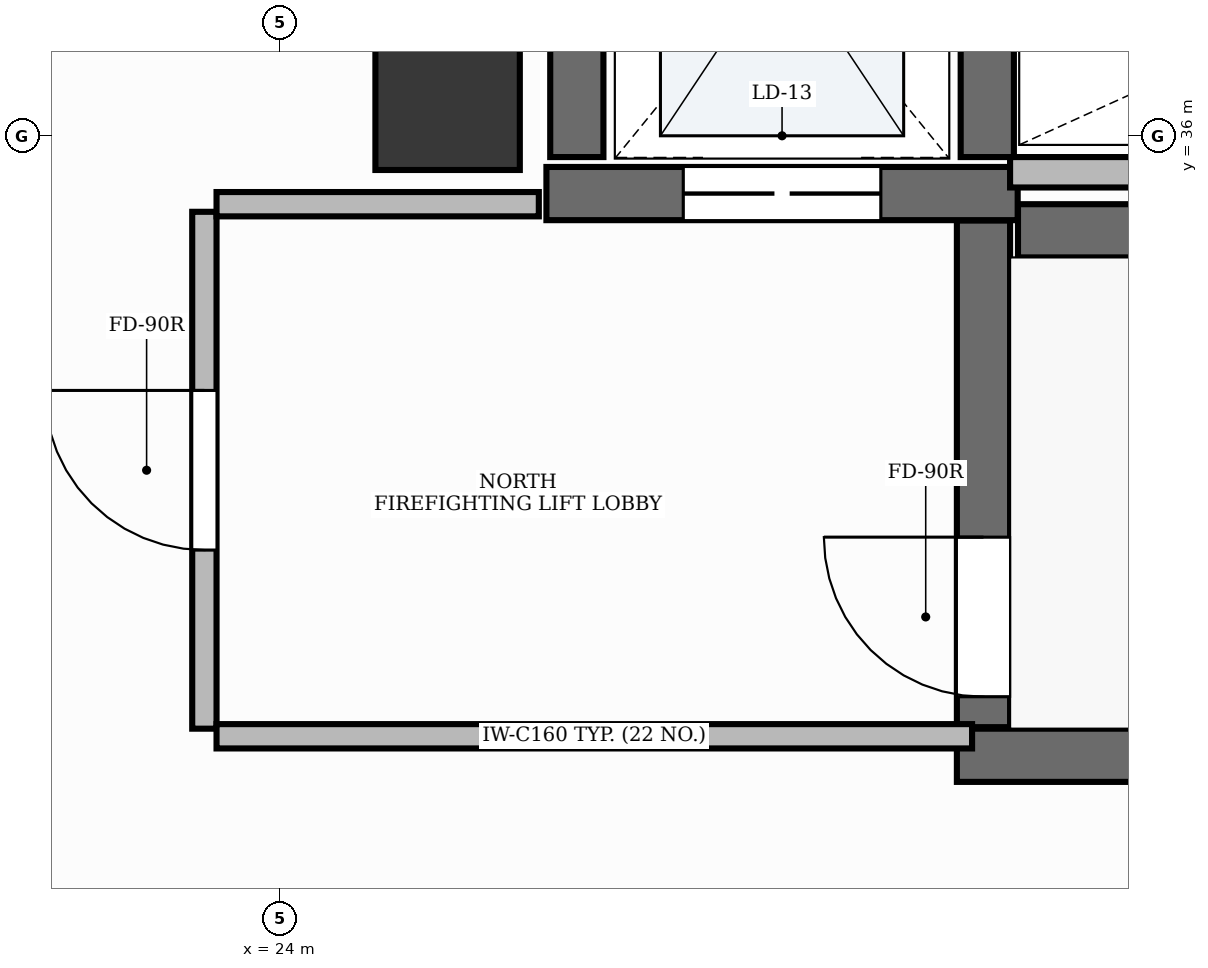
"""IFC4 building model, lengths in metres.
Left out: names, types, materials, properties, quantities, classifications, styles, units other than length and angle.
Written with IfcOpenShell. Run it as: python <this file> out.ifc"""

import sys

from ifc_helpers import new_model, si_unit, direction, frame, frame_2d, origin, origin_2d, place, context, subcontext, project, spatial, rectangle, extrude, element, fill, save


model = new_model("IFC4")
c1 = context("Model", 3, precision=1e-05, world=origin(), true_north=direction((0.0, 1.0)))
c2 = subcontext(c1, "Body", "Model", "MODEL_VIEW")
j1 = project(units=[si_unit("LENGTHUNIT", "METRE"), si_unit("PLANEANGLEUNIT", "RADIAN")], contexts=[c1])
p1 = place(None, origin())
s1 = spatial("IfcSite", under=j1, at=p1, CompositionType="ELEMENT")
p2 = place(p1, origin())
s2 = spatial("IfcBuilding", under=s1, at=p2, CompositionType="ELEMENT")
p3 = place(p2, frame((0.0, 0.0, 291.0)))
s3 = spatial("IfcBuildingStorey", under=s2, at=p3, CompositionType="ELEMENT", Elevation=291.0)
p4 = place(p3, frame((28.852, 35.375, 0.0), z_axis=(0.0, 0.0, 1.0), x_axis=(1.0, 0.0, 0.0)))
e1 = element("IfcWall", 1, at=p4, inside=s3, PredefinedType="SHEAR", context=c2, shape_type="SweptSolid", body=[
    extrude(rectangle(XDim=8.148, YDim=0.35, at=frame_2d((4.074, 0.0))), origin(), (0.0, 0.0, 1.0), 6.3),
])
p5 = place(p3, frame((28.45, 31.925, 0.0), z_axis=(0.0, 0.0, 1.0), x_axis=(1.0, 0.0, 0.0)))
e2 = element("IfcWall", 2, at=p5, inside=s3, PredefinedType="SHEAR", context=c2, shape_type="SweptSolid", body=[
    extrude(rectangle(XDim=8.55, YDim=0.35, at=frame_2d((4.275, 0.0))), origin(), (0.0, 0.0, 1.0), 6.3),
])
p6 = place(p3, frame((28.625, 32.11, 0.0), z_axis=(0.0, 0.0, 1.0), x_axis=(0.0, 1.0, 0.0)))
e3 = element("IfcWall", 3, at=p6, inside=s3, PredefinedType="SHEAR", context=c2, shape_type="SweptSolid", body=[
    extrude(rectangle(XDim=3.333, YDim=0.35, at=frame_2d((1.667, 0.0))), origin(), (0.0, 0.0, 1.0), 6.3),
])
p7 = place(p6, frame((0.2, 0.0, 0.0)))
e4 = element("IfcOpeningElement", 4, at=p7, cuts=e3, PredefinedType="OPENING", context=c2, shape_type="SweptSolid", body=[
    extrude(rectangle(XDim=1.05, YDim=2.15, at=frame_2d((0.525, 1.075))), frame((0.0, 0.19, 0.0), z_axis=(0.0, -1.0, 0.0), x_axis=(1.0, 0.0, 0.0)), (0.0, 0.0, 1.0), 0.38),
])
p8 = place(p3, frame((25.75, 35.62, 0.0), z_axis=(0.0, 0.0, 1.0), x_axis=(1.0, 0.0, 0.0)))
e5 = element("IfcWall", 5, at=p8, inside=s3, PredefinedType="SHEAR", context=c2, shape_type="SweptSolid", body=[
    extrude(rectangle(XDim=3.1, YDim=0.35, at=frame_2d((1.55, 0.0))), origin(), (0.0, 0.0, 1.0), 6.3),
])
p9 = place(p8, frame((0.9, 0.0, 0.0)))
e6 = element("IfcOpeningElement", 6, at=p9, cuts=e5, PredefinedType="OPENING", context=c2, shape_type="SweptSolid", body=[
    extrude(rectangle(XDim=1.3, YDim=2.2, at=frame_2d((0.65, 1.1))), frame((0.0, 0.19, 0.0), z_axis=(0.0, -1.0, 0.0), x_axis=(1.0, 0.0, 0.0)), (0.0, 0.0, 1.0), 0.38),
])
for number, where, z_axis, x_axis in (
    (7, (25.95, 35.86, 0.0), (0.0, 0.0, 1.0), (0.0, 1.0, 0.0)),
    (8, (28.65, 35.86, 0.0), (0.0, 0.0, 1.0), (0.0, 1.0, 0.0)),
):
    element("IfcWall", number, at=place(p3, frame(where, z_axis=z_axis, x_axis=x_axis)), inside=s3, PredefinedType="SHEAR", context=c2, shape_type="SweptSolid", body=[
        extrude(rectangle(XDim=2.7, YDim=0.35, at=frame_2d((1.35, 0.0))), origin(), (0.0, 0.0, 1.0), 6.3),
    ])
p10 = place(p3, frame((25.1, 36.25, -0.0), z_axis=(0.0, 0.0, 1.0), x_axis=(1.0, 0.0, 0.0)))
e9 = element("IfcColumn", 9, at=p10, inside=s3, PredefinedType="PILASTER", context=c2, shape_type="SweptSolid", body=[
    extrude(rectangle(XDim=0.95, YDim=0.95, at=origin_2d()), origin(), (0.0, 0.0, 1.0), 6.301),
])
p11 = place(p3, frame((28.8, 35.76, 0.0), z_axis=(0.0, 0.0, 1.0), x_axis=(1.0, 0.0, 0.0)))
e10 = element("IfcWall", 10, at=p11, inside=s3, PredefinedType="PARTITIONING", context=c2, shape_type="SweptSolid", body=[
    extrude(rectangle(XDim=4.57, YDim=0.2, at=frame_2d((2.285, 0.0))), origin(), (0.0, 0.0, 1.0), 4.61),
])
p12 = place(p3, frame((23.5, 32.1, 0.0), z_axis=(0.0, 0.0, 1.0), x_axis=(0.0, 1.0, 0.0)))
e11 = element("IfcWall", 11, at=p12, inside=s3, PredefinedType="PARTITIONING", context=c2, shape_type="SweptSolid", body=[
    extrude(rectangle(XDim=3.4, YDim=0.16, at=frame_2d((1.7, 0.0))), origin(), (0.0, 0.0, 1.0), 4.61),
])
p13 = place(p12, frame((1.175, 0.0, 0.0)))
e12 = element("IfcOpeningElement", 12, at=p13, cuts=e11, PredefinedType="OPENING", context=c2, shape_type="SweptSolid", body=[
    extrude(rectangle(XDim=1.05, YDim=2.15, at=frame_2d((0.525, 1.075))), frame((0.0, 0.095, 0.0), z_axis=(0.0, -1.0, 0.0), x_axis=(1.0, 0.0, 0.0)), (0.0, 0.0, 1.0), 0.19),
])
p14 = place(p3, frame((23.58, 32.05, 0.0), z_axis=(0.0, 0.0, 1.0), x_axis=(1.0, 0.0, 0.0)))
e13 = element("IfcWall", 13, at=p14, inside=s3, PredefinedType="PARTITIONING", context=c2, shape_type="SweptSolid", body=[
    extrude(rectangle(XDim=4.97, YDim=0.16, at=frame_2d((2.485, 0.0))), origin(), (0.0, 0.0, 1.0), 4.61),
])
p15 = place(p3, frame((23.58, 35.55, 0.0), z_axis=(0.0, 0.0, 1.0), x_axis=(1.0, 0.0, 0.0)))
e14 = element("IfcWall", 14, at=p15, inside=s3, PredefinedType="PARTITIONING", context=c2, shape_type="SweptSolid", body=[
    extrude(rectangle(XDim=2.12, YDim=0.16, at=frame_2d((1.06, 0.0))), origin(), (0.0, 0.0, 1.0), 4.61),
])
p16 = place(p7, origin())
e15 = element("IfcDoor", 15, at=p16, inside=s3, OperationType="SINGLE_SWING_RIGHT", PredefinedType="DOOR", context=c2, shape_type="SweptSolid", body=[
    extrude(rectangle(XDim=1.05, YDim=2.15, at=frame_2d((0.525, 1.075))), frame((0.0, 0.025, 0.0), z_axis=(0.0, -1.0, 0.0), x_axis=(1.0, 0.0, 0.0)), (0.0, 0.0, 1.0), 0.05),
])
fill(e4, e15)
p17 = place(p9, origin())
e16 = element("IfcDoor", 16, at=p17, inside=s3, OperationType="DOUBLE_DOOR_SLIDING", PredefinedType="DOOR", context=c2, shape_type="SweptSolid", body=[
    extrude(rectangle(XDim=1.3, YDim=2.2, at=frame_2d((0.65, 1.1))), frame((0.0, 0.025, 0.0), z_axis=(0.0, -1.0, 0.0), x_axis=(1.0, 0.0, 0.0)), (0.0, 0.0, 1.0), 0.05),
])
fill(e6, e16)
p18 = place(p13, origin())
e17 = element("IfcDoor", 17, at=p18, inside=s3, OperationType="SINGLE_SWING_RIGHT", PredefinedType="DOOR", context=c2, shape_type="SweptSolid", body=[
    extrude(rectangle(XDim=1.05, YDim=2.15, at=frame_2d((0.525, 1.075))), frame((0.0, 0.025, 0.0), z_axis=(0.0, -1.0, 0.0), x_axis=(1.0, 0.0, 0.0)), (0.0, 0.0, 1.0), 0.05),
])
fill(e12, e17)
save(model, sys.argv[1])
